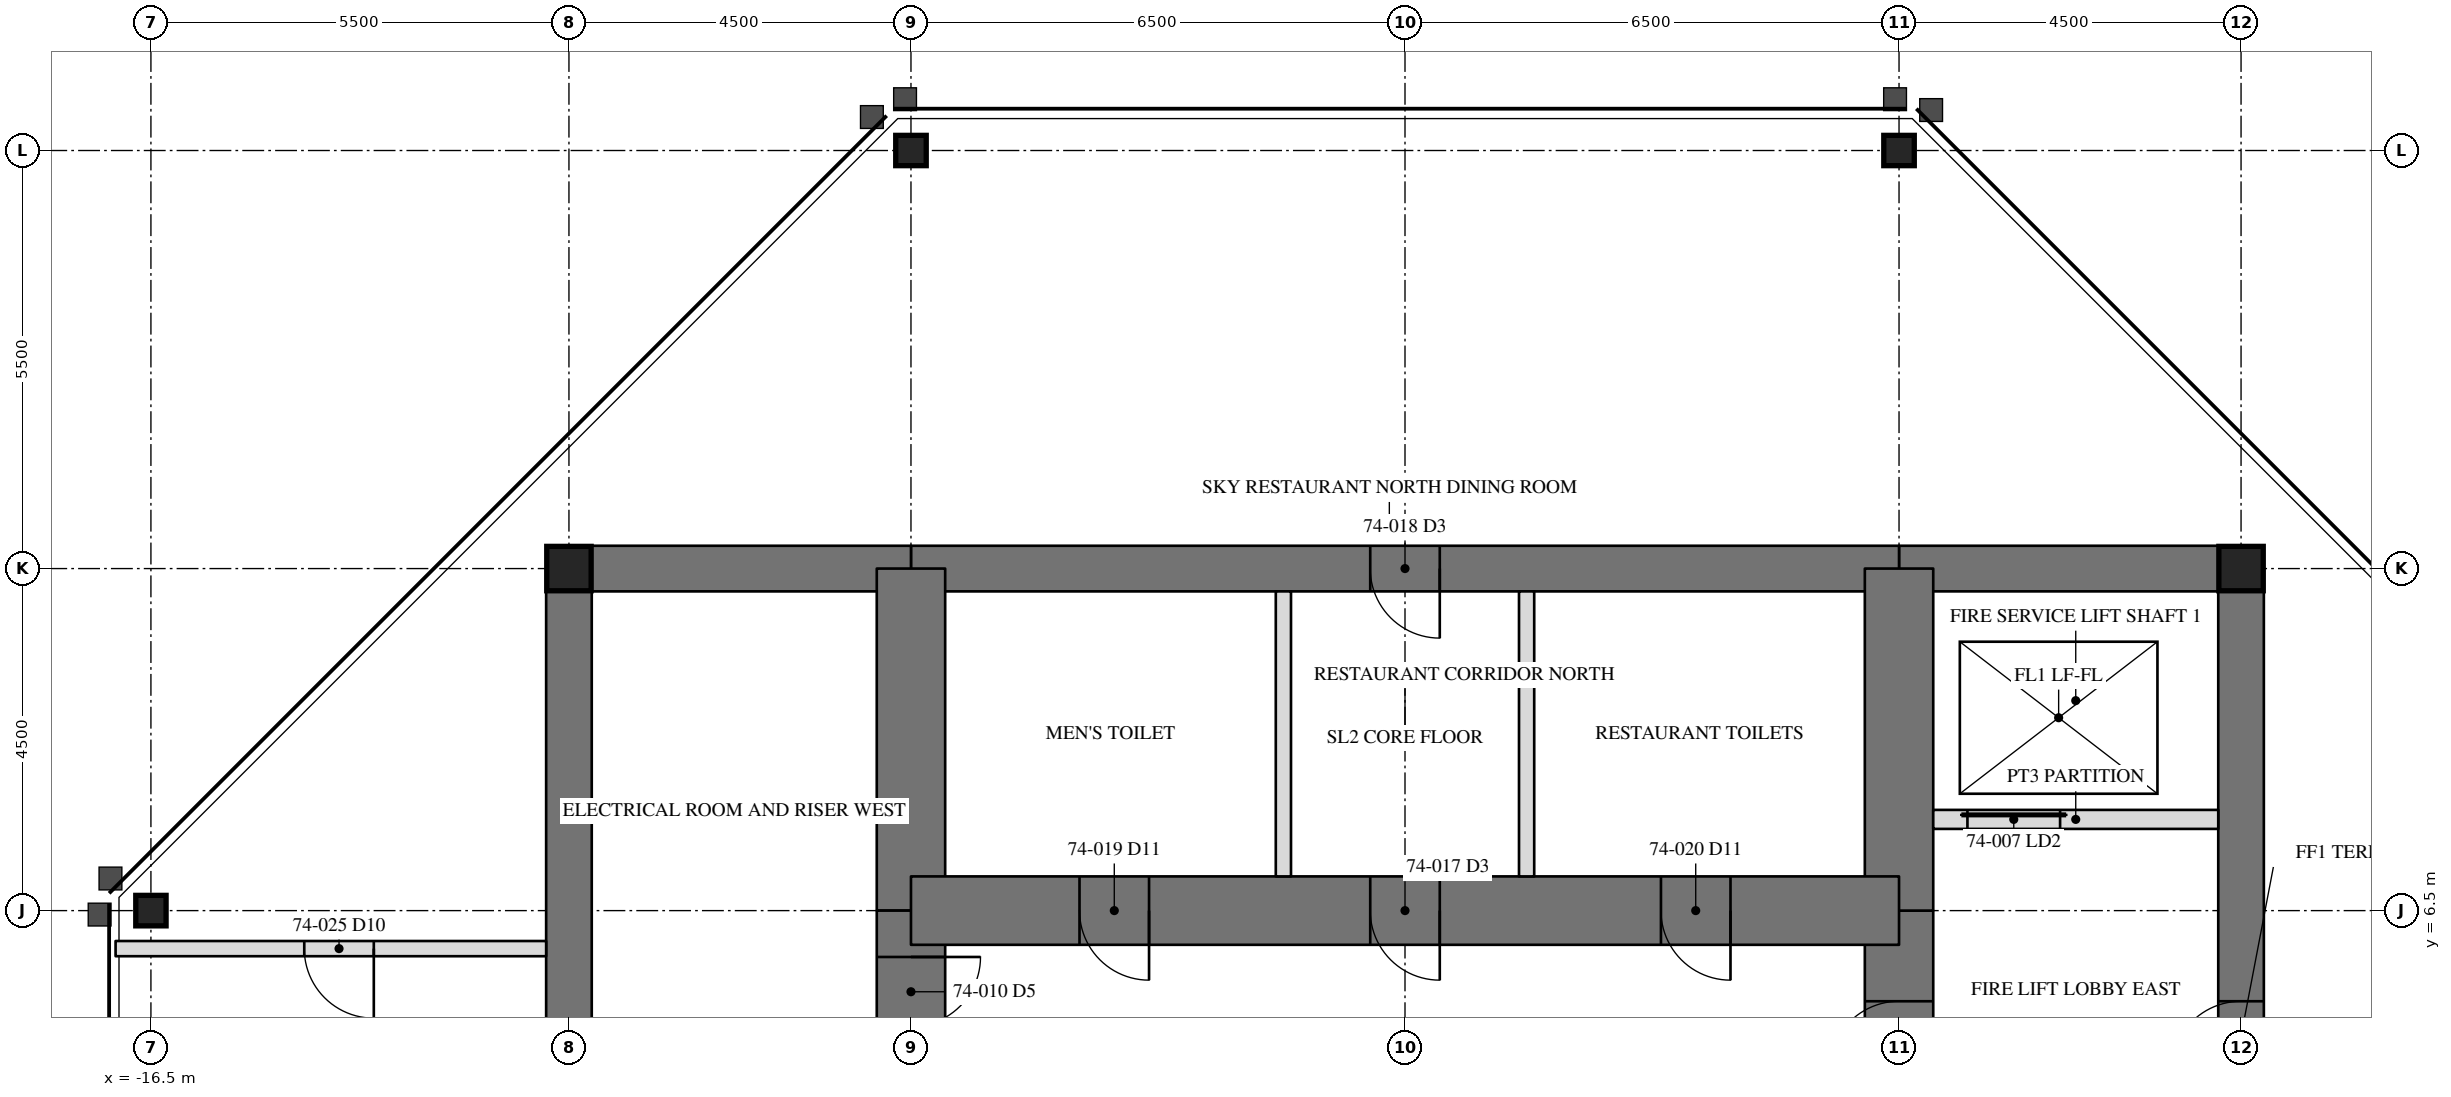
"""IFC4 building model, lengths in metres.
Left out: names, types, materials, properties, quantities, classifications, styles, units other than length and angle.
Written with IfcOpenShell. Run it as: python <this file> out.ifc"""

import sys

from ifc_helpers import new_model, si_unit, direction, frame, frame_2d, origin, origin_2d, place, context, subcontext, project, spatial, rectangle, hollow_rectangle, i_section, extrude, element, fill, save


model = new_model("IFC4")
c1 = context("Model", 3, precision=1e-05, world=origin(), true_north=direction((0.0, 1.0)))
c2 = subcontext(c1, "Body", "Model", "MODEL_VIEW")
j1 = project(units=[si_unit("LENGTHUNIT", "METRE"), si_unit("PLANEANGLEUNIT", "RADIAN")], contexts=[c1])
p1 = place(None, origin())
s1 = spatial("IfcSite", under=j1, at=p1, CompositionType="ELEMENT")
p2 = place(p1, origin())
s2 = spatial("IfcBuilding", under=s1, at=p2, CompositionType="ELEMENT")
p3 = place(p2, frame((0.0, 0.0, 299.2)))
s3 = spatial("IfcBuildingStorey", under=s2, at=p3, CompositionType="ELEMENT", Elevation=299.2)
for number, where, z_axis, x_axis in (
    (1, (6.5, 16.5, 0.0), (0.0, 0.0, 1.0), (1.0, 0.0, 0.0)),
    (2, (-6.5, 16.5, 0.0), (0.0, 0.0, 1.0), (1.0, 0.0, 0.0)),
    (3, (-16.5, 6.5, 0.0), (0.0, 0.0, 1.0), (0.0, 1.0, 0.0)),
):
    element("IfcColumn", number, at=place(p3, frame(where, z_axis=z_axis, x_axis=x_axis)), inside=s3, PredefinedType="COLUMN", context=c2, shape_type="SweptSolid", body=[
        extrude(i_section(OverallWidth=0.401, OverallDepth=0.399, WebThickness=0.025, FlangeThickness=0.04, at=origin_2d()), origin(), (0.0, 0.0, 1.0), 5.0),
    ])
p4 = place(p3, frame((11.0, -11.0, 0.0), z_axis=(0.0, 0.0, 1.0), x_axis=(0.0, 1.0, 0.0)))
e4 = element("IfcWall", 4, at=p4, inside=s3, PredefinedType="SHEAR", context=c2, shape_type="SweptSolid", body=[
    extrude(rectangle(XDim=22.0, YDim=0.6, at=frame_2d((11.0, 0.0))), origin(), (0.0, 0.0, 1.0), 5.0),
])
p5 = place(p4, frame((15.393, 0.0, 0.0)))
e5 = element("IfcOpeningElement", 5, at=p5, cuts=e4, PredefinedType="OPENING", context=c2, shape_type="SweptSolid", body=[
    extrude(rectangle(XDim=0.915, YDim=2.134, at=frame_2d((0.458, 1.067))), frame((0.0, 0.31, 0.0), z_axis=(0.0, -1.0, 0.0), x_axis=(1.0, 0.0, 0.0)), (0.0, 0.0, 1.0), 0.62),
])
p6 = place(p3, frame((-11.0, 11.0, 0.0), z_axis=(0.0, 0.0, 1.0), x_axis=(0.0, -1.0, 0.0)))
e6 = element("IfcWall", 6, at=p6, inside=s3, PredefinedType="SHEAR", context=c2, shape_type="SweptSolid", body=[
    extrude(rectangle(XDim=22.0, YDim=0.6, at=frame_2d((11.0, 0.0))), origin(), (0.0, 0.0, 1.0), 5.0),
])
p7 = place(p6, frame((15.393, 0.0, 0.0)))
e7 = element("IfcOpeningElement", 7, at=p7, cuts=e6, PredefinedType="OPENING", context=c2, shape_type="SweptSolid", body=[
    extrude(rectangle(XDim=0.915, YDim=2.134, at=frame_2d((0.458, 1.067))), frame((0.0, 0.31, 0.0), z_axis=(0.0, -1.0, 0.0), x_axis=(1.0, 0.0, 0.0)), (0.0, 0.0, 1.0), 0.62),
])
p8 = place(p3, frame((11.0, 11.0, 0.0), z_axis=(0.0, 0.0, 1.0), x_axis=(-1.0, 0.0, 0.0)))
e8 = element("IfcWall", 8, at=p8, inside=s3, PredefinedType="SHEAR", context=c2, shape_type="SweptSolid", body=[
    extrude(rectangle(XDim=4.5, YDim=0.6, at=frame_2d((2.25, 0.0))), origin(), (0.0, 0.0, 1.0), 5.0),
])
p9 = place(p3, frame((6.5, 11.0, 0.0), z_axis=(0.0, 0.0, 1.0), x_axis=(-1.0, 0.0, 0.0)))
e9 = element("IfcWall", 9, at=p9, inside=s3, PredefinedType="SHEAR", context=c2, shape_type="SweptSolid", body=[
    extrude(rectangle(XDim=13.0, YDim=0.6, at=frame_2d((6.5, 0.0))), origin(), (0.0, 0.0, 1.0), 5.0),
])
p10 = place(p9, frame((6.042, 0.0, 0.0)))
e10 = element("IfcOpeningElement", 10, at=p10, cuts=e9, PredefinedType="OPENING", context=c2, shape_type="SweptSolid", body=[
    extrude(rectangle(XDim=0.915, YDim=2.134, at=frame_2d((0.458, 1.067))), frame((0.0, 0.31, 0.0), z_axis=(0.0, -1.0, 0.0), x_axis=(1.0, 0.0, 0.0)), (0.0, 0.0, 1.0), 0.62),
])
p11 = place(p3, frame((-6.5, 11.0, 0.0), z_axis=(0.0, 0.0, 1.0), x_axis=(-1.0, 0.0, 0.0)))
e11 = element("IfcWall", 11, at=p11, inside=s3, PredefinedType="SHEAR", context=c2, shape_type="SweptSolid", body=[
    extrude(rectangle(XDim=4.5, YDim=0.6, at=frame_2d((2.25, 0.0))), origin(), (0.0, 0.0, 1.0), 5.0),
])
p12 = place(p3, frame((6.5, -6.5, 0.0), z_axis=(0.0, 0.0, 1.0), x_axis=(0.0, 1.0, 0.0)))
e12 = element("IfcWall", 12, at=p12, inside=s3, PredefinedType="SHEAR", context=c2, shape_type="SweptSolid", body=[
    extrude(rectangle(XDim=13.0, YDim=0.9, at=frame_2d((6.5, 0.0))), origin(), (0.0, 0.0, 1.0), 5.0),
])
p13 = place(p12, frame((10.893, 0.0, 0.0)))
e13 = element("IfcOpeningElement", 13, at=p13, cuts=e12, PredefinedType="OPENING", context=c2, shape_type="SweptSolid", body=[
    extrude(rectangle(XDim=0.915, YDim=2.134, at=frame_2d((0.458, 1.067))), frame((0.0, 0.46, 0.0), z_axis=(0.0, -1.0, 0.0), x_axis=(1.0, 0.0, 0.0)), (0.0, 0.0, 1.0), 0.92),
])
p14 = place(p12, frame((0.61, 0.0, 0.0)))
e14 = element("IfcOpeningElement", 14, at=p14, cuts=e12, PredefinedType="OPENING", context=c2, shape_type="SweptSolid", body=[
    extrude(rectangle(XDim=0.915, YDim=2.134, at=frame_2d((0.458, 1.067))), frame((0.0, 0.46, 0.0), z_axis=(0.0, -1.0, 0.0), x_axis=(1.0, 0.0, 0.0)), (0.0, 0.0, 1.0), 0.92),
])
for number, where, z_axis, x_axis in (
    (15, (6.5, 6.5, 0.0), (0.0, 0.0, 1.0), (0.0, 1.0, 0.0)),
    (16, (-6.5, 11.0, 0.0), (0.0, 0.0, 1.0), (0.0, -1.0, 0.0)),
):
    element("IfcWall", number, at=place(p3, frame(where, z_axis=z_axis, x_axis=x_axis)), inside=s3, PredefinedType="SHEAR", context=c2, shape_type="SweptSolid", body=[
        extrude(rectangle(XDim=4.5, YDim=0.9, at=frame_2d((2.25, 0.0))), origin(), (0.0, 0.0, 1.0), 5.0),
    ])
p15 = place(p3, frame((-6.5, 6.5, 0.0), z_axis=(0.0, 0.0, 1.0), x_axis=(0.0, -1.0, 0.0)))
e17 = element("IfcWall", 17, at=p15, inside=s3, PredefinedType="SHEAR", context=c2, shape_type="SweptSolid", body=[
    extrude(rectangle(XDim=13.0, YDim=0.9, at=frame_2d((6.5, 0.0))), origin(), (0.0, 0.0, 1.0), 5.0),
])
p16 = place(p15, frame((10.893, 0.0, 0.0)))
e18 = element("IfcOpeningElement", 18, at=p16, cuts=e17, PredefinedType="OPENING", context=c2, shape_type="SweptSolid", body=[
    extrude(rectangle(XDim=0.915, YDim=2.134, at=frame_2d((0.458, 1.067))), frame((0.0, 0.46, 0.0), z_axis=(0.0, -1.0, 0.0), x_axis=(1.0, 0.0, 0.0)), (0.0, 0.0, 1.0), 0.92),
])
p17 = place(p15, frame((0.61, 0.0, 0.0)))
e19 = element("IfcOpeningElement", 19, at=p17, cuts=e17, PredefinedType="OPENING", context=c2, shape_type="SweptSolid", body=[
    extrude(rectangle(XDim=0.915, YDim=2.134, at=frame_2d((0.458, 1.067))), frame((0.0, 0.46, 0.0), z_axis=(0.0, -1.0, 0.0), x_axis=(1.0, 0.0, 0.0)), (0.0, 0.0, 1.0), 0.92),
])
p18 = place(p3, frame((6.5, 6.5, 0.0), z_axis=(0.0, 0.0, 1.0), x_axis=(-1.0, 0.0, 0.0)))
e20 = element("IfcWall", 20, at=p18, inside=s3, PredefinedType="SHEAR", context=c2, shape_type="SweptSolid", body=[
    extrude(rectangle(XDim=13.0, YDim=0.9, at=frame_2d((6.5, 0.0))), origin(), (0.0, 0.0, 1.0), 5.0),
])
p19 = place(p18, frame((6.042, 0.0, 0.0)))
e21 = element("IfcOpeningElement", 21, at=p19, cuts=e20, PredefinedType="OPENING", context=c2, shape_type="SweptSolid", body=[
    extrude(rectangle(XDim=0.915, YDim=2.134, at=frame_2d((0.458, 1.067))), frame((0.0, 0.46, 0.0), z_axis=(0.0, -1.0, 0.0), x_axis=(1.0, 0.0, 0.0)), (0.0, 0.0, 1.0), 0.92),
])
p20 = place(p18, frame((9.867, 0.0, 0.0)))
e22 = element("IfcOpeningElement", 22, at=p20, cuts=e20, PredefinedType="OPENING", context=c2, shape_type="SweptSolid", body=[
    extrude(rectangle(XDim=0.915, YDim=2.134, at=frame_2d((0.458, 1.067))), frame((0.0, 0.46, 0.0), z_axis=(0.0, -1.0, 0.0), x_axis=(1.0, 0.0, 0.0)), (0.0, 0.0, 1.0), 0.92),
])
p21 = place(p18, frame((2.218, 0.0, 0.0)))
e23 = element("IfcOpeningElement", 23, at=p21, cuts=e20, PredefinedType="OPENING", context=c2, shape_type="SweptSolid", body=[
    extrude(rectangle(XDim=0.915, YDim=2.134, at=frame_2d((0.458, 1.067))), frame((0.0, 0.46, 0.0), z_axis=(0.0, -1.0, 0.0), x_axis=(1.0, 0.0, 0.0)), (0.0, 0.0, 1.0), 0.92),
])
for number, where, z_axis, x_axis in (
    (24, (11.0, 11.0, 0.0), (0.0, 0.0, 1.0), (1.0, 0.0, 0.0)),
    (25, (-11.0, 11.0, 0.0), (0.0, 0.0, 1.0), (1.0, 0.0, 0.0)),
):
    element("IfcColumn", number, at=place(p3, frame(where, z_axis=z_axis, x_axis=x_axis)), inside=s3, PredefinedType="COLUMN", context=c2, shape_type="SweptSolid", body=[
        extrude(hollow_rectangle(XDim=0.584, YDim=0.584, WallThickness=0.051, at=origin_2d()), origin(), (0.0, 0.0, 1.0), 5.0),
    ])
p22 = place(p3, frame((6.95, 7.7, 0.0), z_axis=(0.0, 0.0, 1.0), x_axis=(1.0, 0.0, 0.0)))
e26 = element("IfcWall", 26, at=p22, inside=s3, PredefinedType="PARTITIONING", context=c2, shape_type="SweptSolid", body=[
    extrude(rectangle(XDim=3.75, YDim=0.25, at=frame_2d((1.875, 0.0))), origin(), (0.0, 0.0, 1.0), 4.81),
])
p23 = place(p22, frame((0.45, 0.0, 0.0)))
e27 = element("IfcOpeningElement", 27, at=p23, cuts=e26, PredefinedType="OPENING", context=c2, shape_type="SweptSolid", body=[
    extrude(rectangle(XDim=1.219, YDim=2.134, at=frame_2d((0.609, 1.067))), frame((0.0, 0.135, 0.0), z_axis=(0.0, -1.0, 0.0), x_axis=(1.0, 0.0, 0.0)), (0.0, 0.0, 1.0), 0.27),
])
for number, where, z_axis, x_axis in (
    (28, (-1.6, 6.95, 0.0), (0.0, 0.0, 1.0), (0.0, 1.0, 0.0)),
    (29, (1.6, 6.95, 0.0), (0.0, 0.0, 1.0), (0.0, 1.0, 0.0)),
):
    element("IfcWall", number, at=place(p3, frame(where, z_axis=z_axis, x_axis=x_axis)), inside=s3, PredefinedType="PARTITIONING", context=c2, shape_type="SweptSolid", body=[
        extrude(rectangle(XDim=3.75, YDim=0.2, at=frame_2d((1.875, 0.0))), origin(), (0.0, 0.0, 1.0), 4.81),
    ])
p24 = place(p3, frame((-11.3, 6.0, 0.0), z_axis=(0.0, 0.0, 1.0), x_axis=(-1.0, 0.0, 0.0)))
e30 = element("IfcWall", 30, at=p24, inside=s3, PredefinedType="PARTITIONING", context=c2, shape_type="SweptSolid", body=[
    extrude(rectangle(XDim=5.665, YDim=0.2, at=frame_2d((2.833, 0.0))), origin(), (0.0, 0.0, 1.0), 4.81),
])
p25 = place(p24, frame((2.268, 0.0, 0.0)))
e31 = element("IfcOpeningElement", 31, at=p25, cuts=e30, PredefinedType="OPENING", context=c2, shape_type="SweptSolid", body=[
    extrude(rectangle(XDim=0.915, YDim=2.134, at=frame_2d((0.458, 1.067))), frame((0.0, 0.11, 0.0), z_axis=(0.0, -1.0, 0.0), x_axis=(1.0, 0.0, 0.0)), (0.0, 0.0, 1.0), 0.22),
])
p26 = place(p5, origin())
e32 = element("IfcDoor", 32, at=p26, inside=s3, OperationType="SINGLE_SWING_RIGHT", PredefinedType="DOOR", context=c2, shape_type="SweptSolid", body=[
    extrude(rectangle(XDim=0.915, YDim=2.134, at=frame_2d((0.458, 1.067))), frame((0.0, -0.225, 0.0), z_axis=(0.0, -1.0, 0.0), x_axis=(1.0, 0.0, 0.0)), (0.0, 0.0, 1.0), 0.05),
])
fill(e5, e32)
p27 = place(p13, origin())
e33 = element("IfcDoor", 33, at=p27, inside=s3, OperationType="SINGLE_SWING_RIGHT", PredefinedType="DOOR", context=c2, shape_type="SweptSolid", body=[
    extrude(rectangle(XDim=0.915, YDim=2.134, at=frame_2d((0.458, 1.067))), frame((0.0, -0.375, 0.0), z_axis=(0.0, -1.0, 0.0), x_axis=(1.0, 0.0, 0.0)), (0.0, 0.0, 1.0), 0.05),
])
fill(e13, e33)
p28 = place(p23, origin())
e34 = element("IfcDoor", 34, at=p28, inside=s3, OperationType="SLIDING_TO_LEFT", PredefinedType="DOOR", context=c2, shape_type="SweptSolid", body=[
    extrude(rectangle(XDim=1.219, YDim=2.134, at=frame_2d((0.609, 1.067))), frame((0.0, 0.025, 0.0), z_axis=(0.0, -1.0, 0.0), x_axis=(1.0, 0.0, 0.0)), (0.0, 0.0, 1.0), 0.05),
])
fill(e27, e34)
p29 = place(p17, origin())
e35 = element("IfcDoor", 35, at=p29, inside=s3, OperationType="SINGLE_SWING_RIGHT", PredefinedType="DOOR", context=c2, shape_type="SweptSolid", body=[
    extrude(rectangle(XDim=0.915, YDim=2.134, at=frame_2d((0.458, 1.067))), frame((0.0, -0.375, 0.0), z_axis=(0.0, -1.0, 0.0), x_axis=(1.0, 0.0, 0.0)), (0.0, 0.0, 1.0), 0.05),
])
fill(e19, e35)
p30 = place(p19, origin())
e36 = element("IfcDoor", 36, at=p30, inside=s3, OperationType="SINGLE_SWING_RIGHT", PredefinedType="DOOR", context=c2, shape_type="SweptSolid", body=[
    extrude(rectangle(XDim=0.915, YDim=2.134, at=frame_2d((0.458, 1.067))), frame((0.0, -0.375, 0.0), z_axis=(0.0, -1.0, 0.0), x_axis=(1.0, 0.0, 0.0)), (0.0, 0.0, 1.0), 0.05),
])
fill(e21, e36)
p31 = place(p10, origin())
e37 = element("IfcDoor", 37, at=p31, inside=s3, OperationType="SINGLE_SWING_RIGHT", PredefinedType="DOOR", context=c2, shape_type="SweptSolid", body=[
    extrude(rectangle(XDim=0.915, YDim=2.134, at=frame_2d((0.458, 1.067))), frame((0.0, -0.225, 0.0), z_axis=(0.0, -1.0, 0.0), x_axis=(1.0, 0.0, 0.0)), (0.0, 0.0, 1.0), 0.05),
])
fill(e10, e37)
p32 = place(p20, origin())
e38 = element("IfcDoor", 38, at=p32, inside=s3, OperationType="SINGLE_SWING_LEFT", PredefinedType="DOOR", context=c2, shape_type="SweptSolid", body=[
    extrude(rectangle(XDim=0.915, YDim=2.134, at=frame_2d((0.458, 1.067))), frame((0.0, -0.375, 0.0), z_axis=(0.0, -1.0, 0.0), x_axis=(1.0, 0.0, 0.0)), (0.0, 0.0, 1.0), 0.05),
])
fill(e22, e38)
p33 = place(p21, origin())
e39 = element("IfcDoor", 39, at=p33, inside=s3, OperationType="SINGLE_SWING_LEFT", PredefinedType="DOOR", context=c2, shape_type="SweptSolid", body=[
    extrude(rectangle(XDim=0.915, YDim=2.134, at=frame_2d((0.458, 1.067))), frame((0.0, -0.375, 0.0), z_axis=(0.0, -1.0, 0.0), x_axis=(1.0, 0.0, 0.0)), (0.0, 0.0, 1.0), 0.05),
])
fill(e23, e39)
p34 = place(p25, origin())
e40 = element("IfcDoor", 40, at=p34, inside=s3, OperationType="SINGLE_SWING_LEFT", PredefinedType="DOOR", context=c2, shape_type="SweptSolid", body=[
    extrude(rectangle(XDim=0.915, YDim=2.134, at=frame_2d((0.458, 1.067))), frame((0.0, 0.025, 0.0), z_axis=(0.0, -1.0, 0.0), x_axis=(1.0, 0.0, 0.0)), (0.0, 0.0, 1.0), 0.05),
])
fill(e31, e40)
save(model, sys.argv[1])
